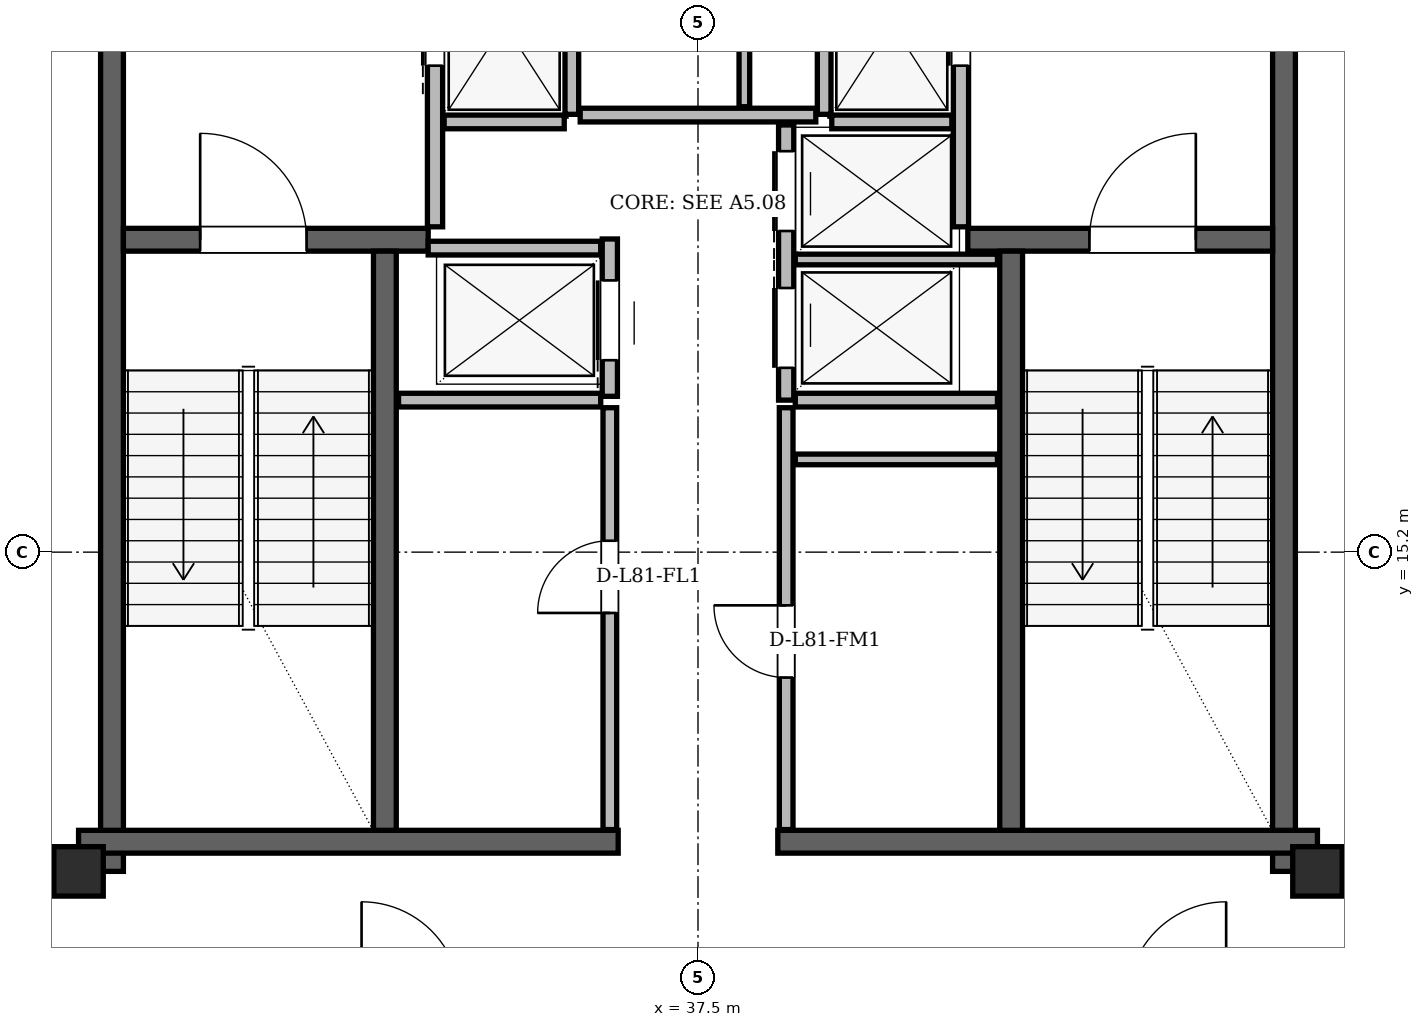
"""IFC4 building model, lengths in metres.
Left out: names, types, materials, properties, quantities, classifications, styles, units other than length and angle.
Written with IfcOpenShell. Run it as: python <this file> out.ifc"""

import sys

from ifc_helpers import new_model, si_unit, direction, frame, frame_2d, origin, origin_2d, place, context, subcontext, project, spatial, rectangle, hollow_rectangle, extrude, element, fill, save


model = new_model("IFC4")
c1 = context("Model", 3, precision=1e-05, world=origin(), true_north=direction((0.0, 1.0)))
c2 = subcontext(c1, "Body", "Model", "MODEL_VIEW")
j1 = project(units=[si_unit("LENGTHUNIT", "METRE"), si_unit("PLANEANGLEUNIT", "RADIAN")], contexts=[c1])
p1 = place(None, origin())
s1 = spatial("IfcSite", under=j1, at=p1, CompositionType="ELEMENT")
p2 = place(p1, origin())
s2 = spatial("IfcBuilding", under=s1, at=p2, CompositionType="ELEMENT")
p3 = place(p2, frame((0.0, 0.0, 309.6)))
s3 = spatial("IfcBuildingStorey", under=s2, at=p3, CompositionType="ELEMENT", Elevation=309.6)
for number, where, z_axis, x_axis in (
    (1, (29.35, 11.0, 0.0), (0.0, 0.0, 1.0), (1.0, 0.0, 0.0)),
    (2, (45.65, 11.0, 0.0), (0.0, 0.0, 1.0), (1.0, 0.0, 0.0)),
):
    element("IfcColumn", number, at=place(p3, frame(where, z_axis=z_axis, x_axis=x_axis)), inside=s3, PredefinedType="COLUMN", context=c2, shape_type="SweptSolid", body=[
        extrude(hollow_rectangle(XDim=0.65, YDim=0.65, WallThickness=0.05, at=origin_2d()), origin(), (0.0, 0.0, 1.0), 4.5),
    ])
for number, where, z_axis, x_axis in (
    (3, (29.79, 11.0, 0.0), (0.0, 0.0, 1.0), (0.0, 1.0, 0.0)),
    (4, (45.21, 11.0, 0.0), (0.0, 0.0, 1.0), (0.0, 1.0, 0.0)),
):
    element("IfcWall", number, at=place(p3, frame(where, z_axis=z_axis, x_axis=x_axis)), inside=s3, PredefinedType="SHEAR", context=c2, shape_type="SweptSolid", body=[
        extrude(rectangle(XDim=13.3, YDim=0.3, at=frame_2d((6.65, 0.0))), origin(), (0.0, 0.0, 1.0), 4.24),
    ])
for number, where, z_axis, x_axis in (
    (5, (29.35, 11.39, 0.0), (0.0, 0.0, 1.0), (1.0, 0.0, 0.0)),
    (6, (38.55, 11.39, 0.0), (0.0, 0.0, 1.0), (1.0, 0.0, 0.0)),
):
    element("IfcWall", number, at=place(p3, frame(where, z_axis=z_axis, x_axis=x_axis)), inside=s3, PredefinedType="SHEAR", context=c2, shape_type="SweptSolid", body=[
        extrude(rectangle(XDim=7.1, YDim=0.3, at=frame_2d((3.55, 0.0))), origin(), (0.0, 0.0, 1.0), 4.24),
    ])
p4 = place(p3, frame((29.94, 19.31, 0.0), z_axis=(0.0, 0.0, 1.0), x_axis=(1.0, 0.0, 0.0)))
e7 = element("IfcWall", 7, at=p4, inside=s3, PredefinedType="SHEAR", context=c2, shape_type="SweptSolid", body=[
    extrude(rectangle(XDim=4.01, YDim=0.3, at=frame_2d((2.005, 0.0))), origin(), (0.0, 0.0, 1.0), 4.24),
])
p5 = place(p4, frame((1.01, 0.0, 0.0)))
e8 = element("IfcOpeningElement", 8, at=p5, cuts=e7, PredefinedType="OPENING", context=c2, shape_type="SweptSolid", body=[
    extrude(rectangle(XDim=1.4, YDim=2.2, at=frame_2d((0.7, 1.1))), frame((0.0, 0.15, 0.0), z_axis=(0.0, -1.0, 0.0), x_axis=(1.0, 0.0, 0.0)), (0.0, 0.0, 1.0), 0.3),
])
p6 = place(p3, frame((41.05, 19.31, 0.0), z_axis=(0.0, 0.0, 1.0), x_axis=(1.0, 0.0, 0.0)))
e9 = element("IfcWall", 9, at=p6, inside=s3, PredefinedType="SHEAR", context=c2, shape_type="SweptSolid", body=[
    extrude(rectangle(XDim=4.01, YDim=0.3, at=frame_2d((2.005, 0.0))), origin(), (0.0, 0.0, 1.0), 4.24),
])
p7 = place(p6, frame((1.6, 0.0, 0.0)))
e10 = element("IfcOpeningElement", 10, at=p7, cuts=e9, PredefinedType="OPENING", context=c2, shape_type="SweptSolid", body=[
    extrude(rectangle(XDim=1.4, YDim=2.2, at=frame_2d((0.7, 1.1))), frame((0.0, 0.15, 0.0), z_axis=(0.0, -1.0, 0.0), x_axis=(1.0, 0.0, 0.0)), (0.0, 0.0, 1.0), 0.3),
])
for number, where, z_axis, x_axis in (
    (11, (33.38, 11.54, 0.0), (0.0, 0.0, 1.0), (0.0, 1.0, 0.0)),
    (12, (41.62, 11.54, 0.0), (0.0, 0.0, 1.0), (0.0, 1.0, 0.0)),
):
    element("IfcWall", number, at=place(p3, frame(where, z_axis=z_axis, x_axis=x_axis)), inside=s3, PredefinedType="SHEAR", context=c2, shape_type="SweptSolid", body=[
        extrude(rectangle(XDim=7.62, YDim=0.3, at=frame_2d((3.81, 0.0))), origin(), (0.0, 0.0, 1.0), 4.24),
    ])
p8 = place(p3, frame((34.04, 19.48, 0.0), z_axis=(0.0, 0.0, 1.0), x_axis=(0.0, 1.0, 0.0)))
e13 = element("IfcWall", 13, at=p8, inside=s3, PredefinedType="PARTITIONING", context=c2, shape_type="SweptSolid", body=[
    extrude(rectangle(XDim=4.5, YDim=0.2, at=frame_2d((2.25, 0.0))), origin(), (0.0, 0.0, 1.0), 4.24),
])
p9 = place(p8, frame((2.12, 0.0, 0.0)))
e14 = element("IfcOpeningElement", 14, at=p9, cuts=e13, PredefinedType="OPENING", context=c2, shape_type="SweptSolid", body=[
    extrude(rectangle(XDim=1.1, YDim=2.2, at=frame_2d((0.55, 1.1))), frame((0.0, 0.1, 0.0), z_axis=(0.0, -1.0, 0.0), x_axis=(1.0, 0.0, 0.0)), (0.0, 0.0, 1.0), 0.2),
])
p10 = place(p3, frame((35.84, 20.96, 0.0), z_axis=(0.0, 0.0, 1.0), x_axis=(0.0, 1.0, 0.0)))
e15 = element("IfcWall", 15, at=p10, inside=s3, PredefinedType="PARTITIONING", context=c2, shape_type="SweptSolid", body=[
    extrude(rectangle(XDim=3.02, YDim=0.18, at=frame_2d((1.51, 0.0))), origin(), (0.0, 0.0, 1.0), 4.24),
])
p11 = place(p3, frame((34.16, 20.86, 0.0), z_axis=(0.0, 0.0, 1.0), x_axis=(1.0, 0.0, 0.0)))
e16 = element("IfcWall", 16, at=p11, inside=s3, PredefinedType="PARTITIONING", context=c2, shape_type="SweptSolid", body=[
    extrude(rectangle(XDim=1.58, YDim=0.18, at=frame_2d((0.79, 0.0))), origin(), (0.0, 0.0, 1.0), 4.24),
])
p12 = place(p3, frame((40.96, 19.48, 0.0), z_axis=(0.0, 0.0, 1.0), x_axis=(0.0, 1.0, 0.0)))
e17 = element("IfcWall", 17, at=p12, inside=s3, PredefinedType="PARTITIONING", context=c2, shape_type="SweptSolid", body=[
    extrude(rectangle(XDim=4.5, YDim=0.2, at=frame_2d((2.25, 0.0))), origin(), (0.0, 0.0, 1.0), 4.24),
])
p13 = place(p12, frame((2.12, 0.0, 0.0)))
e18 = element("IfcOpeningElement", 18, at=p13, cuts=e17, PredefinedType="OPENING", context=c2, shape_type="SweptSolid", body=[
    extrude(rectangle(XDim=1.1, YDim=2.2, at=frame_2d((0.55, 1.1))), frame((0.0, 0.1, 0.0), z_axis=(0.0, -1.0, 0.0), x_axis=(1.0, 0.0, 0.0)), (0.0, 0.0, 1.0), 0.2),
])
p14 = place(p3, frame((39.16, 20.96, 0.0), z_axis=(0.0, 0.0, 1.0), x_axis=(0.0, 1.0, 0.0)))
e19 = element("IfcWall", 19, at=p14, inside=s3, PredefinedType="PARTITIONING", context=c2, shape_type="SweptSolid", body=[
    extrude(rectangle(XDim=3.02, YDim=0.18, at=frame_2d((1.51, 0.0))), origin(), (0.0, 0.0, 1.0), 4.24),
])
p15 = place(p3, frame((39.26, 20.86, 0.0), z_axis=(0.0, 0.0, 1.0), x_axis=(1.0, 0.0, 0.0)))
e20 = element("IfcWall", 20, at=p15, inside=s3, PredefinedType="PARTITIONING", context=c2, shape_type="SweptSolid", body=[
    extrude(rectangle(XDim=1.58, YDim=0.18, at=frame_2d((0.79, 0.0))), origin(), (0.0, 0.0, 1.0), 4.24),
])
p16 = place(p3, frame((36.34, 17.25, 0.0), z_axis=(0.0, 0.0, 1.0), x_axis=(0.0, 1.0, 0.0)))
e21 = element("IfcWall", 21, at=p16, inside=s3, PredefinedType="PARTITIONING", context=c2, shape_type="SweptSolid", body=[
    extrude(rectangle(XDim=2.07, YDim=0.2, at=frame_2d((1.035, 0.0))), origin(), (0.0, 0.0, 1.0), 4.24),
])
p17 = place(p16, frame((0.475, 0.0, 0.0)))
e22 = element("IfcOpeningElement", 22, at=p17, cuts=e21, PredefinedType="OPENING", context=c2, shape_type="SweptSolid", body=[
    extrude(rectangle(XDim=1.05, YDim=2.15, at=frame_2d((0.525, 1.075))), frame((0.0, 0.1, 0.0), z_axis=(0.0, -1.0, 0.0), x_axis=(1.0, 0.0, 0.0)), (0.0, 0.0, 1.0), 0.2),
])
p18 = place(p3, frame((33.95, 19.2, 0.0), z_axis=(0.0, 0.0, 1.0), x_axis=(1.0, 0.0, 0.0)))
e23 = element("IfcWall", 23, at=p18, inside=s3, PredefinedType="PARTITIONING", context=c2, shape_type="SweptSolid", body=[
    extrude(rectangle(XDim=2.27, YDim=0.18, at=frame_2d((1.135, 0.0))), origin(), (0.0, 0.0, 1.0), 4.24),
])
p19 = place(p3, frame((33.56, 17.2, 0.0), z_axis=(0.0, 0.0, 1.0), x_axis=(1.0, 0.0, 0.0)))
e24 = element("IfcWall", 24, at=p19, inside=s3, PredefinedType="PARTITIONING", context=c2, shape_type="SweptSolid", body=[
    extrude(rectangle(XDim=2.66, YDim=0.18, at=frame_2d((1.33, 0.0))), origin(), (0.0, 0.0, 1.0), 4.24),
])
p20 = place(p3, frame((36.34, 11.55, 0.0), z_axis=(0.0, 0.0, 1.0), x_axis=(0.0, 1.0, 0.0)))
e25 = element("IfcWall", 25, at=p20, inside=s3, PredefinedType="PARTITIONING", context=c2, shape_type="SweptSolid", body=[
    extrude(rectangle(XDim=5.55, YDim=0.18, at=frame_2d((2.775, 0.0))), origin(), (0.0, 0.0, 1.0), 4.24),
])
p21 = place(p20, frame((2.85, 0.0, 0.0)))
e26 = element("IfcOpeningElement", 26, at=p21, cuts=e25, PredefinedType="OPENING", context=c2, shape_type="SweptSolid", body=[
    extrude(rectangle(XDim=0.95, YDim=2.1, at=frame_2d((0.475, 1.05))), frame((0.0, 0.09, 0.0), z_axis=(0.0, -1.0, 0.0), x_axis=(1.0, 0.0, 0.0)), (0.0, 0.0, 1.0), 0.18),
])
p22 = place(p3, frame((38.66, 17.2, 0.0), z_axis=(0.0, 0.0, 1.0), x_axis=(0.0, 1.0, 0.0)))
e27 = element("IfcWall", 27, at=p22, inside=s3, PredefinedType="PARTITIONING", context=c2, shape_type="SweptSolid", body=[
    extrude(rectangle(XDim=3.62, YDim=0.2, at=frame_2d((1.81, 0.0))), origin(), (0.0, 0.0, 1.0), 4.24),
])
p23 = place(p22, frame((0.425, 0.0, 0.0)))
e28 = element("IfcOpeningElement", 28, at=p23, cuts=e27, PredefinedType="OPENING", context=c2, shape_type="SweptSolid", body=[
    extrude(rectangle(XDim=1.05, YDim=2.15, at=frame_2d((0.525, 1.075))), frame((0.0, 0.1, 0.0), z_axis=(0.0, -1.0, 0.0), x_axis=(1.0, 0.0, 0.0)), (0.0, 0.0, 1.0), 0.2),
])
p24 = place(p22, frame((2.225, 0.0, 0.0)))
e29 = element("IfcOpeningElement", 29, at=p24, cuts=e27, PredefinedType="OPENING", context=c2, shape_type="SweptSolid", body=[
    extrude(rectangle(XDim=1.05, YDim=2.15, at=frame_2d((0.525, 1.075))), frame((0.0, 0.1, 0.0), z_axis=(0.0, -1.0, 0.0), x_axis=(1.0, 0.0, 0.0)), (0.0, 0.0, 1.0), 0.2),
])
p25 = place(p3, frame((38.78, 17.2, 0.0), z_axis=(0.0, 0.0, 1.0), x_axis=(1.0, 0.0, 0.0)))
e30 = element("IfcWall", 30, at=p25, inside=s3, PredefinedType="PARTITIONING", context=c2, shape_type="SweptSolid", body=[
    extrude(rectangle(XDim=2.66, YDim=0.18, at=frame_2d((1.33, 0.0))), origin(), (0.0, 0.0, 1.0), 4.24),
])
p26 = place(p3, frame((38.78, 19.05, 0.0), z_axis=(0.0, 0.0, 1.0), x_axis=(1.0, 0.0, 0.0)))
e31 = element("IfcWall", 31, at=p26, inside=s3, PredefinedType="PARTITIONING", context=c2, shape_type="SweptSolid", body=[
    extrude(rectangle(XDim=2.66, YDim=0.14, at=frame_2d((1.33, 0.0))), origin(), (0.0, 0.0, 1.0), 4.24),
])
p27 = place(p3, frame((38.66, 11.55, 0.0), z_axis=(0.0, 0.0, 1.0), x_axis=(0.0, 1.0, 0.0)))
e32 = element("IfcWall", 32, at=p27, inside=s3, PredefinedType="PARTITIONING", context=c2, shape_type="SweptSolid", body=[
    extrude(rectangle(XDim=5.55, YDim=0.18, at=frame_2d((2.775, 0.0))), origin(), (0.0, 0.0, 1.0), 4.24),
])
p28 = place(p27, frame((2.0, 0.0, 0.0)))
e33 = element("IfcOpeningElement", 33, at=p28, cuts=e32, PredefinedType="OPENING", context=c2, shape_type="SweptSolid", body=[
    extrude(rectangle(XDim=0.95, YDim=2.1, at=frame_2d((0.475, 1.05))), frame((0.0, 0.09, 0.0), z_axis=(0.0, -1.0, 0.0), x_axis=(1.0, 0.0, 0.0)), (0.0, 0.0, 1.0), 0.18),
])
p29 = place(p3, frame((38.78, 16.42, 0.0), z_axis=(0.0, 0.0, 1.0), x_axis=(1.0, 0.0, 0.0)))
e34 = element("IfcWall", 34, at=p29, inside=s3, PredefinedType="PARTITIONING", context=c2, shape_type="SweptSolid", body=[
    extrude(rectangle(XDim=2.66, YDim=0.14, at=frame_2d((1.33, 0.0))), origin(), (0.0, 0.0, 1.0), 4.24),
])
p30 = place(p3, frame((35.95, 20.95, 0.0), z_axis=(0.0, 0.0, 1.0), x_axis=(1.0, 0.0, 0.0)))
e35 = element("IfcWall", 35, at=p30, inside=s3, PredefinedType="PARTITIONING", context=c2, shape_type="SweptSolid", body=[
    extrude(rectangle(XDim=3.1, YDim=0.18, at=frame_2d((1.55, 0.0))), origin(), (0.0, 0.0, 1.0), 4.24),
])
p31 = place(p3, frame((38.11, 21.06, 0.0), z_axis=(0.0, 0.0, 1.0), x_axis=(0.0, 1.0, 0.0)))
e36 = element("IfcWall", 36, at=p31, inside=s3, PredefinedType="PARTITIONING", context=c2, shape_type="SweptSolid", body=[
    extrude(rectangle(XDim=2.92, YDim=0.14, at=frame_2d((1.46, 0.0))), origin(), (0.0, 0.0, 1.0), 4.24),
])
p32 = place(p3, frame((28.56, 10.95, 0.0), z_axis=(0.0, 0.0, 1.0), x_axis=(1.0, 0.0, 0.0)))
e37 = element("IfcWall", 37, at=p32, inside=s3, PredefinedType="PARTITIONING", context=c2, shape_type="SweptSolid", body=[
    extrude(rectangle(XDim=0.45, YDim=0.18, at=frame_2d((0.225, 0.0))), origin(), (0.0, 0.0, 1.0), 3.826),
])
p33 = place(p3, frame((45.99, 10.95, 0.0), z_axis=(0.0, 0.0, 1.0), x_axis=(1.0, 0.0, 0.0)))
e38 = element("IfcWall", 38, at=p33, inside=s3, PredefinedType="PARTITIONING", context=c2, shape_type="SweptSolid", body=[
    extrude(rectangle(XDim=0.45, YDim=0.18, at=frame_2d((0.225, 0.0))), origin(), (0.0, 0.0, 1.0), 4.24),
])
p34 = place(p21, origin())
e39 = element("IfcDoor", 39, at=p34, inside=s3, OperationType="SINGLE_SWING_LEFT", PredefinedType="DOOR", context=c2, shape_type="SweptSolid", body=[
    extrude(rectangle(XDim=0.95, YDim=2.1, at=frame_2d((0.475, 1.05))), frame((0.0, 0.025, 0.0), z_axis=(0.0, -1.0, 0.0), x_axis=(1.0, 0.0, 0.0)), (0.0, 0.0, 1.0), 0.05),
])
fill(e26, e39)
p35 = place(p28, origin())
e40 = element("IfcDoor", 40, at=p35, inside=s3, OperationType="SINGLE_SWING_RIGHT", PredefinedType="DOOR", context=c2, shape_type="SweptSolid", body=[
    extrude(rectangle(XDim=0.95, YDim=2.1, at=frame_2d((0.475, 1.05))), frame((0.0, 0.025, 0.0), z_axis=(0.0, -1.0, 0.0), x_axis=(1.0, 0.0, 0.0)), (0.0, 0.0, 1.0), 0.05),
])
fill(e33, e40)
p36 = place(p9, origin())
e41 = element("IfcDoor", 41, at=p36, inside=s3, OperationType="SLIDING_TO_LEFT", PredefinedType="DOOR", context=c2, shape_type="SweptSolid", body=[
    extrude(rectangle(XDim=1.1, YDim=2.2, at=frame_2d((0.55, 1.1))), frame((0.0, 0.025, 0.0), z_axis=(0.0, -1.0, 0.0), x_axis=(1.0, 0.0, 0.0)), (0.0, 0.0, 1.0), 0.05),
])
fill(e14, e41)
p37 = place(p13, origin())
e42 = element("IfcDoor", 42, at=p37, inside=s3, OperationType="SLIDING_TO_RIGHT", PredefinedType="DOOR", context=c2, shape_type="SweptSolid", body=[
    extrude(rectangle(XDim=1.1, YDim=2.2, at=frame_2d((0.55, 1.1))), frame((0.0, 0.025, 0.0), z_axis=(0.0, -1.0, 0.0), x_axis=(1.0, 0.0, 0.0)), (0.0, 0.0, 1.0), 0.05),
])
fill(e18, e42)
p38 = place(p17, origin())
e43 = element("IfcDoor", 43, at=p38, inside=s3, OperationType="SLIDING_TO_LEFT", PredefinedType="DOOR", context=c2, shape_type="SweptSolid", body=[
    extrude(rectangle(XDim=1.05, YDim=2.15, at=frame_2d((0.525, 1.075))), frame((0.0, 0.025, 0.0), z_axis=(0.0, -1.0, 0.0), x_axis=(1.0, 0.0, 0.0)), (0.0, 0.0, 1.0), 0.05),
])
fill(e22, e43)
p39 = place(p23, origin())
e44 = element("IfcDoor", 44, at=p39, inside=s3, OperationType="SLIDING_TO_RIGHT", PredefinedType="DOOR", context=c2, shape_type="SweptSolid", body=[
    extrude(rectangle(XDim=1.05, YDim=2.15, at=frame_2d((0.525, 1.075))), frame((0.0, 0.025, 0.0), z_axis=(0.0, -1.0, 0.0), x_axis=(1.0, 0.0, 0.0)), (0.0, 0.0, 1.0), 0.05),
])
fill(e28, e44)
p40 = place(p24, origin())
e45 = element("IfcDoor", 45, at=p40, inside=s3, OperationType="SLIDING_TO_LEFT", PredefinedType="DOOR", context=c2, shape_type="SweptSolid", body=[
    extrude(rectangle(XDim=1.05, YDim=2.15, at=frame_2d((0.525, 1.075))), frame((0.0, 0.025, 0.0), z_axis=(0.0, -1.0, 0.0), x_axis=(1.0, 0.0, 0.0)), (0.0, 0.0, 1.0), 0.05),
])
fill(e29, e45)
p41 = place(p5, origin())
e46 = element("IfcDoor", 46, at=p41, inside=s3, OperationType="SINGLE_SWING_LEFT", PredefinedType="DOOR", context=c2, shape_type="SweptSolid", body=[
    extrude(rectangle(XDim=1.4, YDim=2.2, at=frame_2d((0.7, 1.1))), frame((0.0, 0.025, 0.0), z_axis=(0.0, -1.0, 0.0), x_axis=(1.0, 0.0, 0.0)), (0.0, 0.0, 1.0), 0.05),
])
fill(e8, e46)
p42 = place(p7, origin())
e47 = element("IfcDoor", 47, at=p42, inside=s3, OperationType="SINGLE_SWING_RIGHT", PredefinedType="DOOR", context=c2, shape_type="SweptSolid", body=[
    extrude(rectangle(XDim=1.4, YDim=2.2, at=frame_2d((0.7, 1.1))), frame((0.0, 0.025, 0.0), z_axis=(0.0, -1.0, 0.0), x_axis=(1.0, 0.0, 0.0)), (0.0, 0.0, 1.0), 0.05),
])
fill(e10, e47)
save(model, sys.argv[1])
